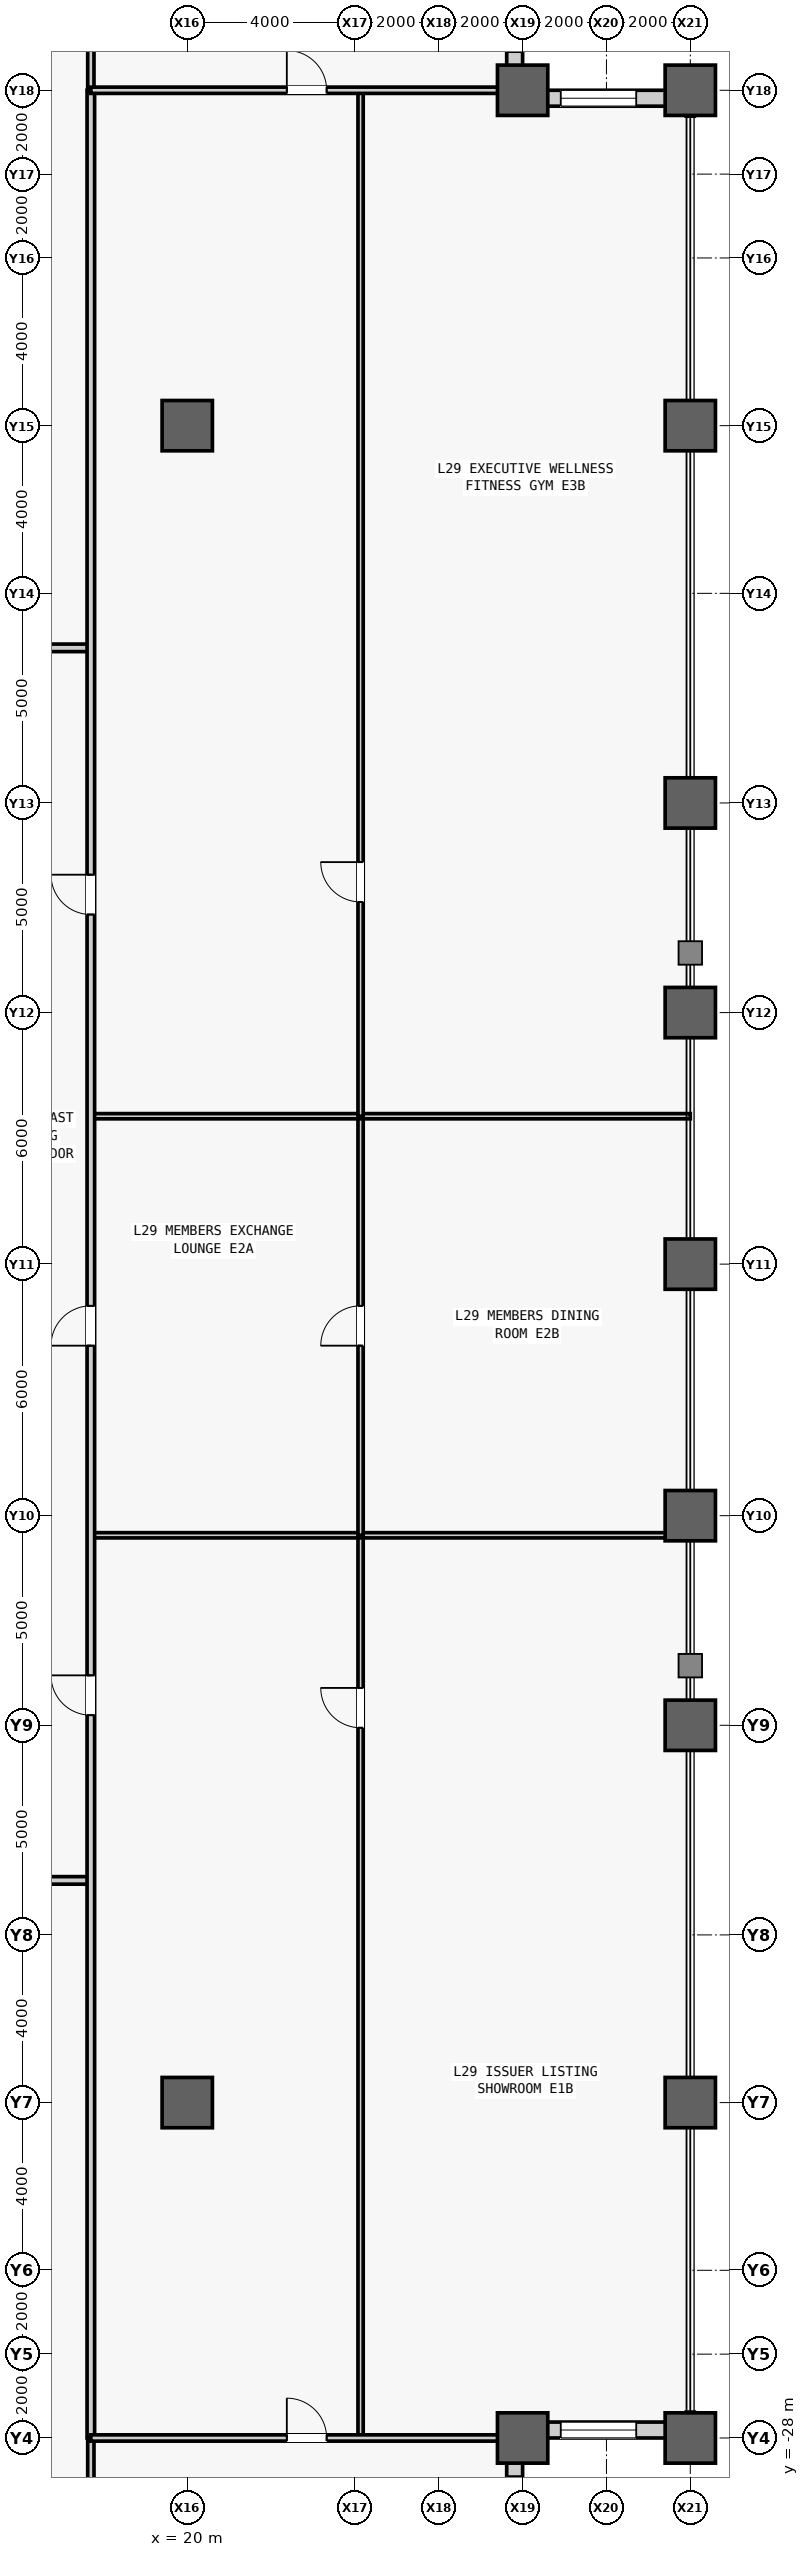
"""IFC4 building model, lengths in metres.
Left out: names, types, materials, properties, quantities, classifications, styles, units other than length and angle.
Written with IfcOpenShell. Run it as: python <this file> out.ifc"""

import sys

from ifc_helpers import new_model, si_unit, direction, frame, frame_2d, origin, origin_2d, place, context, subcontext, project, spatial, rectangle, hollow_rectangle, extrude, source, transform, mapped, element, fill, save


model = new_model("IFC4")
c1 = context("Model", 3, precision=1e-05, world=origin(), true_north=direction((0.0, 1.0)))
c2 = subcontext(c1, "Body", "Model", "MODEL_VIEW")
j1 = project(units=[si_unit("LENGTHUNIT", "METRE"), si_unit("PLANEANGLEUNIT", "RADIAN")], contexts=[c1])
p1 = place(None, origin())
s1 = spatial("IfcSite", under=j1, at=p1, CompositionType="ELEMENT")
p2 = place(p1, origin())
s2 = spatial("IfcBuilding", under=s1, at=p2, CompositionType="ELEMENT")
p3 = place(p2, frame((0.0, 0.0, 128.3)))
s3 = spatial("IfcBuildingStorey", under=s2, at=p3, CompositionType="ELEMENT", Elevation=128.3)
m1 = source(origin(), c2, "Body", "SweptSolid", [
    extrude(hollow_rectangle(XDim=1.2, YDim=1.2, WallThickness=0.07, at=origin_2d()), origin(), (0.0, 0.0, 1.0), 4.1),
])
for number, where, z_axis, x_axis in (
    (1, (20.0, -20.0, 0.0), (0.0, 0.0, 1.0), (1.0, 0.0, 0.0)),
    (2, (20.0, 20.0, 0.0), (0.0, 0.0, 1.0), (1.0, 0.0, 0.0)),
    (3, (28.0, -28.0, 0.0), (0.0, 0.0, 1.0), (1.0, 0.0, 0.0)),
    (4, (28.0, 28.0, 0.0), (0.0, 0.0, 1.0), (1.0, 0.0, 0.0)),
    (5, (32.0, -28.0, 0.0), (0.0, 0.0, 1.0), (1.0, 0.0, 0.0)),
    (6, (32.0, -20.0, 0.0), (0.0, 0.0, 1.0), (1.0, 0.0, 0.0)),
    (7, (32.0, -11.0, 0.0), (0.0, 0.0, 1.0), (1.0, 0.0, 0.0)),
    (8, (32.0, -6.0, 0.0), (0.0, 0.0, 1.0), (1.0, 0.0, 0.0)),
    (9, (32.0, 0.0, 0.0), (0.0, 0.0, 1.0), (1.0, 0.0, 0.0)),
    (10, (32.0, 6.0, 0.0), (0.0, 0.0, 1.0), (1.0, 0.0, 0.0)),
    (11, (32.0, 11.0, 0.0), (0.0, 0.0, 1.0), (1.0, 0.0, 0.0)),
    (12, (32.0, 20.0, 0.0), (0.0, 0.0, 1.0), (1.0, 0.0, 0.0)),
    (13, (32.0, 28.0, 0.0), (0.0, 0.0, 1.0), (1.0, 0.0, 0.0)),
):
    element("IfcColumn", number, at=place(p3, frame(where, z_axis=z_axis, x_axis=x_axis)), inside=s3, PredefinedType="COLUMN", context=c2, shape_type="MappedRepresentation", body=[
        mapped(m1, transform((0.0, 0.0, 0.0), scale=1.0)),
    ])
m2 = source(origin(), c2, "Body", "SweptSolid", [
    extrude(rectangle(XDim=3.62, YDim=0.38, at=frame_2d((1.81, 0.0))), origin(), (0.0, 0.0, 1.0), 3.145),
])
p4 = place(p3, frame((27.81, -31.62, 0.0), z_axis=(0.0, 0.0, 1.0), x_axis=(0.0, 1.0, 0.0)))
e14 = element("IfcWall", 14, at=p4, inside=s3, PredefinedType="STANDARD", context=c2, shape_type="MappedRepresentation", body=[
    mapped(m2, transform((0.0, 0.0, 0.0), scale=1.0)),
])
m3 = source(origin(), c2, "Body", "SweptSolid", [
    extrude(rectangle(XDim=1.8, YDim=2.4, at=frame_2d((0.9, 1.2))), frame((0.0, 0.2, 0.0), z_axis=(0.0, -1.0, 0.0), x_axis=(1.0, 0.0, 0.0)), (0.0, 0.0, 1.0), 0.4),
])
p5 = place(p4, frame((0.91, 0.0, 0.5)))
e15 = element("IfcOpeningElement", 15, at=p5, cuts=e14, PredefinedType="OPENING", context=c2, shape_type="MappedRepresentation", body=[
    mapped(m3, transform((0.0, 0.0, 0.0), scale=1.0)),
])
p6 = place(p3, frame((28.0, -27.81, 0.0), z_axis=(0.0, 0.0, 1.0), x_axis=(1.0, 0.0, 0.0)))
e16 = element("IfcWall", 16, at=p6, inside=s3, PredefinedType="STANDARD", context=c2, shape_type="MappedRepresentation", body=[
    mapped(m2, transform((0.0, 0.0, 0.0), scale=1.0)),
])
p7 = place(p6, frame((0.91, 0.0, 0.5)))
e17 = element("IfcOpeningElement", 17, at=p7, cuts=e16, PredefinedType="OPENING", context=c2, shape_type="MappedRepresentation", body=[
    mapped(m3, transform((0.0, 0.0, 0.0), scale=1.0)),
])
p8 = place(p3, frame((28.0, 27.81, 0.0), z_axis=(0.0, 0.0, 1.0), x_axis=(1.0, 0.0, 0.0)))
e18 = element("IfcWall", 18, at=p8, inside=s3, PredefinedType="STANDARD", context=c2, shape_type="MappedRepresentation", body=[
    mapped(m2, transform((0.0, 0.0, 0.0), scale=1.0)),
])
p9 = place(p8, frame((0.91, 0.0, 0.5)))
e19 = element("IfcOpeningElement", 19, at=p9, cuts=e18, PredefinedType="OPENING", context=c2, shape_type="MappedRepresentation", body=[
    mapped(m3, transform((0.0, 0.0, 0.0), scale=1.0)),
])
p10 = place(p3, frame((27.81, 28.0, 0.0), z_axis=(0.0, 0.0, 1.0), x_axis=(0.0, 1.0, 0.0)))
e20 = element("IfcWall", 20, at=p10, inside=s3, PredefinedType="STANDARD", context=c2, shape_type="MappedRepresentation", body=[
    mapped(m2, transform((0.0, 0.0, 0.0), scale=1.0)),
])
p11 = place(p10, frame((0.91, 0.0, 0.5)))
e21 = element("IfcOpeningElement", 21, at=p11, cuts=e20, PredefinedType="OPENING", context=c2, shape_type="MappedRepresentation", body=[
    mapped(m3, transform((0.0, 0.0, 0.0), scale=1.0)),
])
m4 = source(origin(), c2, "Body", "SweptSolid", [
    extrude(rectangle(XDim=37.1, YDim=0.18, at=frame_2d((18.55, 0.0))), origin(), (0.0, 0.0, 1.0), 3.84),
])
p12 = place(p3, frame((-19.4, -14.7, 0.0), z_axis=(0.0, 0.0, 1.0), x_axis=(1.0, 0.0, 0.0)))
e22 = element("IfcWall", 22, at=p12, inside=s3, PredefinedType="PARTITIONING", context=c2, shape_type="MappedRepresentation", body=[
    mapped(m4, transform((0.0, 0.0, 0.0), scale=1.0)),
])
m5 = source(origin(), c2, "Body", "SweptSolid", [
    extrude(rectangle(XDim=1.05, YDim=2.2, at=frame_2d((0.525, 1.1))), frame((0.0, 0.1, 0.0), z_axis=(0.0, -1.0, 0.0), x_axis=(1.0, 0.0, 0.0)), (0.0, 0.0, 1.0), 0.2),
])
p13 = place(p12, frame((6.056, 0.0, 0.0)))
e23 = element("IfcOpeningElement", 23, at=p13, cuts=e22, PredefinedType="OPENING", context=c2, shape_type="MappedRepresentation", body=[
    mapped(m5, transform((0.0, 0.0, 0.0), scale=1.0)),
])
p14 = place(p12, frame((12.46, 0.0, 0.0)))
e24 = element("IfcOpeningElement", 24, at=p14, cuts=e22, PredefinedType="OPENING", context=c2, shape_type="MappedRepresentation", body=[
    mapped(m5, transform((0.0, 0.0, 0.0), scale=1.0)),
])
p15 = place(p12, frame((22.477, 0.0, 0.0)))
e25 = element("IfcOpeningElement", 25, at=p15, cuts=e22, PredefinedType="OPENING", context=c2, shape_type="MappedRepresentation", body=[
    mapped(m5, transform((0.0, 0.0, 0.0), scale=1.0)),
])
p16 = place(p12, frame((30.473, 0.0, 0.0)))
e26 = element("IfcOpeningElement", 26, at=p16, cuts=e22, PredefinedType="OPENING", context=c2, shape_type="MappedRepresentation", body=[
    mapped(m5, transform((0.0, 0.0, 0.0), scale=1.0)),
])
p17 = place(p3, frame((-19.4, 14.7, 0.0), z_axis=(0.0, 0.0, 1.0), x_axis=(1.0, 0.0, 0.0)))
e27 = element("IfcWall", 27, at=p17, inside=s3, PredefinedType="PARTITIONING", context=c2, shape_type="MappedRepresentation", body=[
    mapped(m4, transform((0.0, 0.0, 0.0), scale=1.0)),
])
p18 = place(p17, frame((10.323, 0.0, 0.0)))
e28 = element("IfcOpeningElement", 28, at=p18, cuts=e27, PredefinedType="OPENING", context=c2, shape_type="MappedRepresentation", body=[
    mapped(m5, transform((0.0, 0.0, 0.0), scale=1.0)),
])
p19 = place(p17, frame((24.722, 0.0, 0.0)))
e29 = element("IfcOpeningElement", 29, at=p19, cuts=e27, PredefinedType="OPENING", context=c2, shape_type="MappedRepresentation", body=[
    mapped(m5, transform((0.0, 0.0, 0.0), scale=1.0)),
])
m6 = source(origin(), c2, "Body", "SweptSolid", [
    extrude(rectangle(XDim=4.0, YDim=0.15, at=frame_2d((2.0, 0.0))), origin(), (0.0, 0.0, 1.0), 3.84),
])
for number, where, z_axis, x_axis in (
    (30, (17.7, -32.0, 0.0), (0.0, 0.0, 1.0), (0.0, 1.0, 0.0)),
    (31, (17.7, 28.0, 0.0), (0.0, 0.0, 1.0), (0.0, 1.0, 0.0)),
):
    element("IfcWall", number, at=place(p3, frame(where, z_axis=z_axis, x_axis=x_axis)), inside=s3, PredefinedType="PARTITIONING", context=c2, shape_type="MappedRepresentation", body=[
        mapped(m6, transform((0.0, 0.0, 0.0), scale=1.0)),
    ])
m7 = source(origin(), c2, "Body", "SweptSolid", [
    extrude(rectangle(XDim=21.532, YDim=0.125, at=frame_2d((10.766, 0.0))), origin(), (0.0, 0.0, 1.0), 3.84),
])
p20 = place(p3, frame((24.135, -28.0, 0.0), z_axis=(0.0, 0.0, 1.0), x_axis=(0.0, 1.0, 0.0)))
e32 = element("IfcWall", 32, at=p20, inside=s3, PredefinedType="PARTITIONING", context=c2, shape_type="MappedRepresentation", body=[
    mapped(m7, transform((0.0, 0.0, 0.0), scale=1.0)),
])
m8 = source(origin(), c2, "Body", "SweptSolid", [
    extrude(rectangle(XDim=0.95, YDim=2.15, at=frame_2d((0.475, 1.075))), frame((0.0, 0.073, 0.0), z_axis=(0.0, -1.0, 0.0), x_axis=(1.0, 0.0, 0.0)), (0.0, 0.0, 1.0), 0.145),
])
p21 = place(p20, frame((16.941, 0.0, 0.0)))
e33 = element("IfcOpeningElement", 33, at=p21, cuts=e32, PredefinedType="OPENING", context=c2, shape_type="MappedRepresentation", body=[
    mapped(m8, transform((0.0, 0.0, 0.0), scale=1.0)),
])
m9 = source(origin(), c2, "Body", "SweptSolid", [
    extrude(rectangle(XDim=14.3, YDim=0.125, at=frame_2d((7.15, 0.0))), origin(), (0.0, 0.0, 1.0), 3.84),
])
p22 = place(p3, frame((17.7, -6.468, 0.0), z_axis=(0.0, 0.0, 1.0), x_axis=(1.0, 0.0, 0.0)))
e34 = element("IfcWall", 34, at=p22, inside=s3, PredefinedType="PARTITIONING", context=c2, shape_type="MappedRepresentation", body=[
    mapped(m9, transform((0.0, 0.0, 0.0), scale=1.0)),
])
m10 = source(origin(), c2, "Body", "SweptSolid", [
    extrude(rectangle(XDim=9.996, YDim=0.125, at=frame_2d((4.998, 0.0))), origin(), (0.0, 0.0, 1.0), 3.84),
])
p23 = place(p3, frame((24.135, -6.468, 0.0), z_axis=(0.0, 0.0, 1.0), x_axis=(0.0, 1.0, 0.0)))
e35 = element("IfcWall", 35, at=p23, inside=s3, PredefinedType="PARTITIONING", context=c2, shape_type="MappedRepresentation", body=[
    mapped(m10, transform((0.0, 0.0, 0.0), scale=1.0)),
])
p24 = place(p23, frame((4.523, 0.0, 0.0)))
e36 = element("IfcOpeningElement", 36, at=p24, cuts=e35, PredefinedType="OPENING", context=c2, shape_type="MappedRepresentation", body=[
    mapped(m8, transform((0.0, 0.0, 0.0), scale=1.0)),
])
p25 = place(p3, frame((17.7, 3.528, 0.0), z_axis=(0.0, 0.0, 1.0), x_axis=(1.0, 0.0, 0.0)))
e37 = element("IfcWall", 37, at=p25, inside=s3, PredefinedType="PARTITIONING", context=c2, shape_type="MappedRepresentation", body=[
    mapped(m9, transform((0.0, 0.0, 0.0), scale=1.0)),
])
m11 = source(origin(), c2, "Body", "SweptSolid", [
    extrude(rectangle(XDim=24.472, YDim=0.125, at=frame_2d((12.236, 0.0))), origin(), (0.0, 0.0, 1.0), 3.84),
])
p26 = place(p3, frame((24.135, 3.528, 0.0), z_axis=(0.0, 0.0, 1.0), x_axis=(0.0, 1.0, 0.0)))
e38 = element("IfcWall", 38, at=p26, inside=s3, PredefinedType="PARTITIONING", context=c2, shape_type="MappedRepresentation", body=[
    mapped(m11, transform((0.0, 0.0, 0.0), scale=1.0)),
])
p27 = place(p26, frame((5.111, 0.0, 0.0)))
e39 = element("IfcOpeningElement", 39, at=p27, cuts=e38, PredefinedType="OPENING", context=c2, shape_type="MappedRepresentation", body=[
    mapped(m8, transform((0.0, 0.0, 0.0), scale=1.0)),
])
m12 = source(origin(), c2, "Body", "SweptSolid", [
    extrude(rectangle(XDim=56.0, YDim=0.18, at=frame_2d((28.0, 0.0))), origin(), (0.0, 0.0, 1.0), 3.84),
])
p28 = place(p3, frame((17.7, -28.0, 0.0), z_axis=(0.0, 0.0, 1.0), x_axis=(0.0, 1.0, 0.0)))
e40 = element("IfcWall", 40, at=p28, inside=s3, PredefinedType="PARTITIONING", context=c2, shape_type="MappedRepresentation", body=[
    mapped(m12, transform((0.0, 0.0, 0.0), scale=1.0)),
])
m13 = source(origin(), c2, "Body", "SweptSolid", [
    extrude(rectangle(XDim=0.95, YDim=2.15, at=frame_2d((0.475, 1.075))), frame((0.0, 0.1, 0.0), z_axis=(0.0, -1.0, 0.0), x_axis=(1.0, 0.0, 0.0)), (0.0, 0.0, 1.0), 0.2),
])
p29 = place(p28, frame((17.241, 0.0, 0.0)))
e41 = element("IfcOpeningElement", 41, at=p29, cuts=e40, PredefinedType="OPENING", context=c2, shape_type="MappedRepresentation", body=[
    mapped(m13, transform((0.0, 0.0, 0.0), scale=1.0)),
])
p30 = place(p28, frame((26.055, 0.0, 0.0)))
e42 = element("IfcOpeningElement", 42, at=p30, cuts=e40, PredefinedType="OPENING", context=c2, shape_type="MappedRepresentation", body=[
    mapped(m13, transform((0.0, 0.0, 0.0), scale=1.0)),
])
p31 = place(p28, frame((36.339, 0.0, 0.0)))
e43 = element("IfcOpeningElement", 43, at=p31, cuts=e40, PredefinedType="OPENING", context=c2, shape_type="MappedRepresentation", body=[
    mapped(m13, transform((0.0, 0.0, 0.0), scale=1.0)),
])
m14 = source(origin(), c2, "Body", "SweptSolid", [
    extrude(rectangle(XDim=10.3, YDim=0.15, at=frame_2d((5.15, 0.0))), origin(), (0.0, 0.0, 1.0), 3.84),
])
p32 = place(p3, frame((17.7, -28.0, 0.0), z_axis=(0.0, 0.0, 1.0), x_axis=(1.0, 0.0, 0.0)))
e44 = element("IfcWall", 44, at=p32, inside=s3, PredefinedType="PARTITIONING", context=c2, shape_type="MappedRepresentation", body=[
    mapped(m14, transform((0.0, 0.0, 0.0), scale=1.0)),
])
m15 = source(origin(), c2, "Body", "SweptSolid", [
    extrude(rectangle(XDim=0.95, YDim=2.15, at=frame_2d((0.475, 1.075))), frame((0.0, 0.085, 0.0), z_axis=(0.0, -1.0, 0.0), x_axis=(1.0, 0.0, 0.0)), (0.0, 0.0, 1.0), 0.17),
])
p33 = place(p32, frame((4.675, 0.0, 0.0)))
e45 = element("IfcOpeningElement", 45, at=p33, cuts=e44, PredefinedType="OPENING", context=c2, shape_type="MappedRepresentation", body=[
    mapped(m15, transform((0.0, 0.0, 0.0), scale=1.0)),
])
p34 = place(p3, frame((17.7, 28.0, 0.0), z_axis=(0.0, 0.0, 1.0), x_axis=(1.0, 0.0, 0.0)))
e46 = element("IfcWall", 46, at=p34, inside=s3, PredefinedType="PARTITIONING", context=c2, shape_type="MappedRepresentation", body=[
    mapped(m14, transform((0.0, 0.0, 0.0), scale=1.0)),
])
p35 = place(p34, frame((4.675, 0.0, 0.0)))
e47 = element("IfcOpeningElement", 47, at=p35, cuts=e46, PredefinedType="OPENING", context=c2, shape_type="MappedRepresentation", body=[
    mapped(m15, transform((0.0, 0.0, 0.0), scale=1.0)),
])
m16 = source(origin(), c2, "Body", "SweptSolid", [
    extrude(rectangle(XDim=1.8, YDim=2.4, at=frame_2d((0.9, 1.2))), frame((0.0, 0.03, 0.0), z_axis=(0.0, -1.0, 0.0), x_axis=(1.0, 0.0, 0.0)), (0.0, 0.0, 1.0), 0.06),
])
p36 = place(p5, origin())
e48 = element("IfcWindow", 48, at=p36, inside=s3, PartitioningType="SINGLE_PANEL", PredefinedType="WINDOW", context=c2, shape_type="MappedRepresentation", body=[
    mapped(m16, transform((0.0, 0.0, 0.0), scale=1.0)),
])
fill(e15, e48)
p37 = place(p7, origin())
e49 = element("IfcWindow", 49, at=p37, inside=s3, PartitioningType="SINGLE_PANEL", PredefinedType="WINDOW", context=c2, shape_type="MappedRepresentation", body=[
    mapped(m16, transform((0.0, 0.0, 0.0), scale=1.0)),
])
fill(e17, e49)
p38 = place(p9, origin())
e50 = element("IfcWindow", 50, at=p38, inside=s3, PartitioningType="SINGLE_PANEL", PredefinedType="WINDOW", context=c2, shape_type="MappedRepresentation", body=[
    mapped(m16, transform((0.0, 0.0, 0.0), scale=1.0)),
])
fill(e19, e50)
p39 = place(p11, origin())
e51 = element("IfcWindow", 51, at=p39, inside=s3, PartitioningType="SINGLE_PANEL", PredefinedType="WINDOW", context=c2, shape_type="MappedRepresentation", body=[
    mapped(m16, transform((0.0, 0.0, 0.0), scale=1.0)),
])
fill(e21, e51)
m17 = source(origin(), c2, "Body", "SweptSolid", [
    extrude(rectangle(XDim=0.95, YDim=2.15, at=frame_2d((0.475, 1.075))), frame((0.0, 0.025, 0.0), z_axis=(0.0, -1.0, 0.0), x_axis=(1.0, 0.0, 0.0)), (0.0, 0.0, 1.0), 0.05),
])
p40 = place(p21, origin())
e52 = element("IfcDoor", 52, at=p40, inside=s3, OperationType="SINGLE_SWING_RIGHT", PredefinedType="DOOR", context=c2, shape_type="MappedRepresentation", body=[
    mapped(m17, transform((0.0, 0.0, 0.0), scale=1.0)),
])
fill(e33, e52)
p41 = place(p24, origin())
e53 = element("IfcDoor", 53, at=p41, inside=s3, OperationType="SINGLE_SWING_LEFT", PredefinedType="DOOR", context=c2, shape_type="MappedRepresentation", body=[
    mapped(m17, transform((0.0, 0.0, 0.0), scale=1.0)),
])
fill(e36, e53)
p42 = place(p27, origin())
e54 = element("IfcDoor", 54, at=p42, inside=s3, OperationType="SINGLE_SWING_RIGHT", PredefinedType="DOOR", context=c2, shape_type="MappedRepresentation", body=[
    mapped(m17, transform((0.0, 0.0, 0.0), scale=1.0)),
])
fill(e39, e54)
p43 = place(p29, origin())
e55 = element("IfcDoor", 55, at=p43, inside=s3, OperationType="SINGLE_SWING_RIGHT", PredefinedType="DOOR", context=c2, shape_type="MappedRepresentation", body=[
    mapped(m17, transform((0.0, 0.0, 0.0), scale=1.0)),
])
fill(e41, e55)
p44 = place(p30, origin())
e56 = element("IfcDoor", 56, at=p44, inside=s3, OperationType="SINGLE_SWING_LEFT", PredefinedType="DOOR", context=c2, shape_type="MappedRepresentation", body=[
    mapped(m17, transform((0.0, 0.0, 0.0), scale=1.0)),
])
fill(e42, e56)
p45 = place(p31, origin())
e57 = element("IfcDoor", 57, at=p45, inside=s3, OperationType="SINGLE_SWING_RIGHT", PredefinedType="DOOR", context=c2, shape_type="MappedRepresentation", body=[
    mapped(m17, transform((0.0, 0.0, 0.0), scale=1.0)),
])
fill(e43, e57)
p46 = place(p33, origin())
e58 = element("IfcDoor", 58, at=p46, inside=s3, OperationType="SINGLE_SWING_LEFT", PredefinedType="DOOR", context=c2, shape_type="MappedRepresentation", body=[
    mapped(m17, transform((0.0, 0.0, 0.0), scale=1.0)),
])
fill(e45, e58)
p47 = place(p35, origin())
e59 = element("IfcDoor", 59, at=p47, inside=s3, OperationType="SINGLE_SWING_LEFT", PredefinedType="DOOR", context=c2, shape_type="MappedRepresentation", body=[
    mapped(m17, transform((0.0, 0.0, 0.0), scale=1.0)),
])
fill(e47, e59)
save(model, sys.argv[1])
